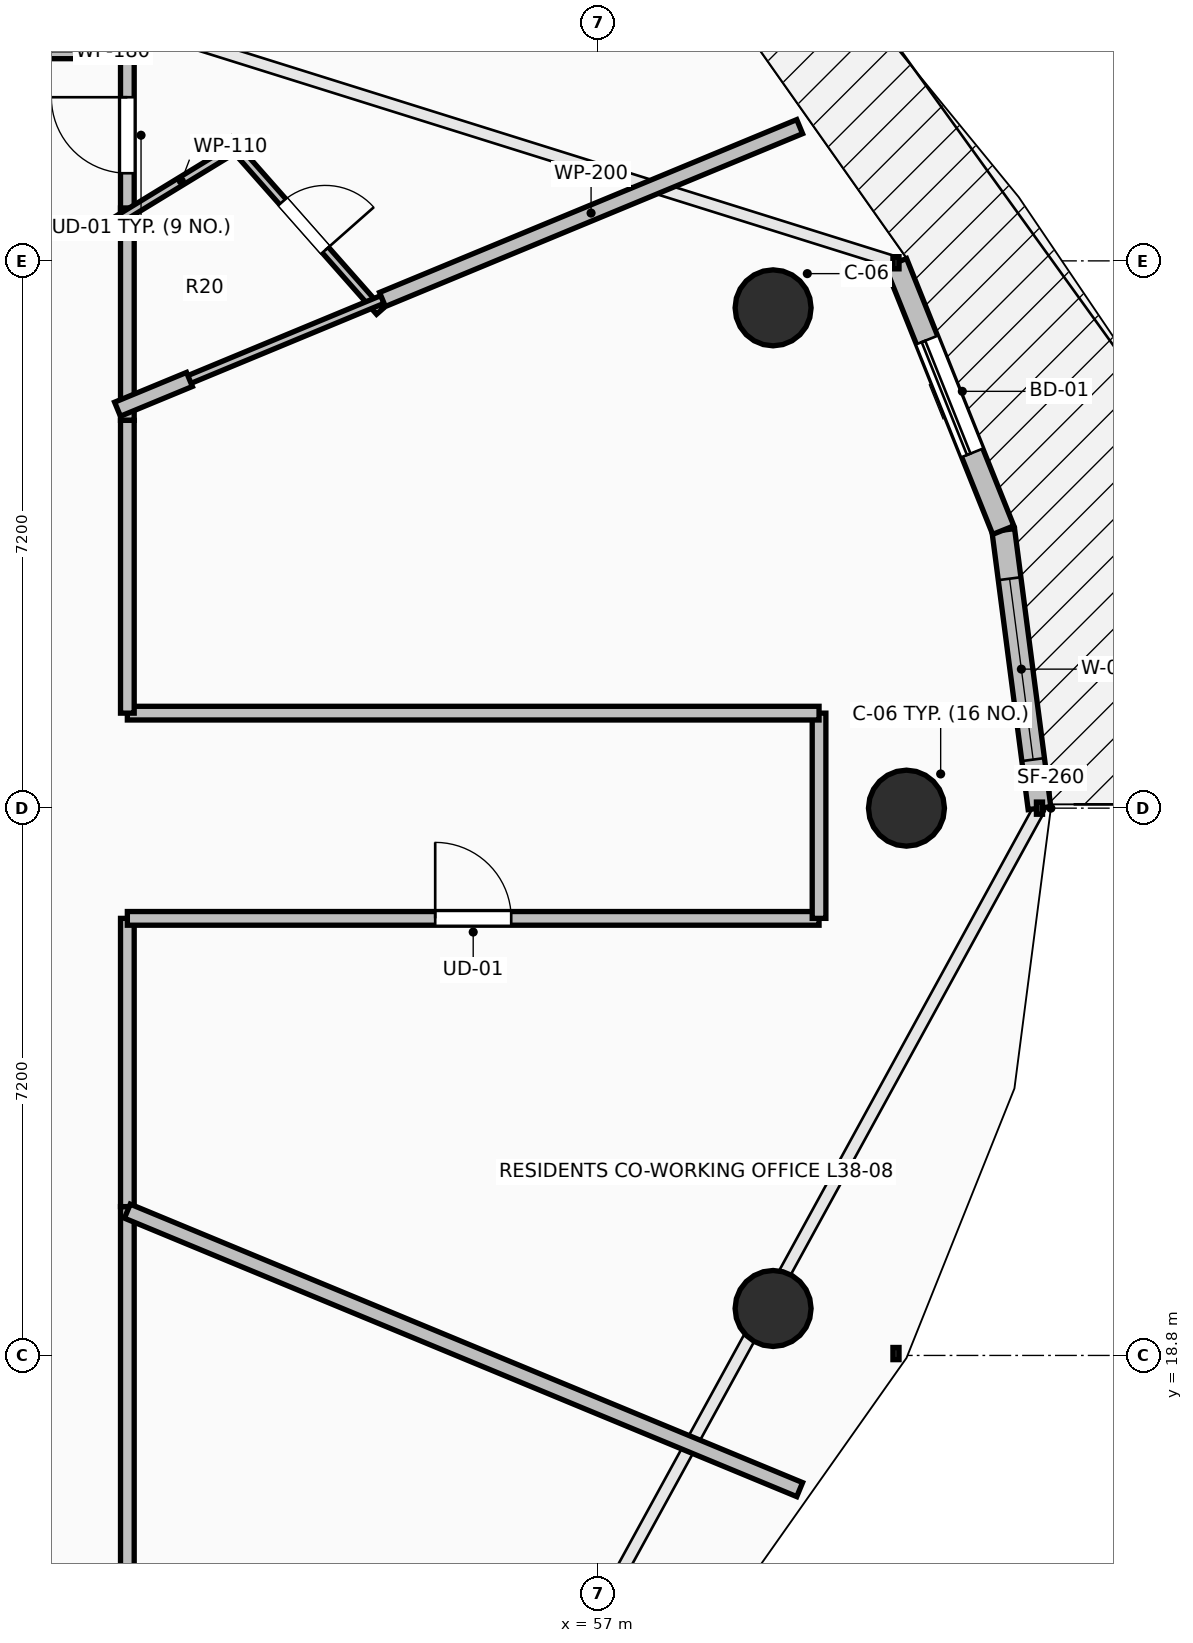
"""IFC4 building model, lengths in metres.
Left out: names, types, materials, properties, quantities, classifications, styles, units other than length and angle.
Written with IfcOpenShell. Run it as: python <this file> out.ifc"""

import sys

from ifc_helpers import new_model, si_unit, direction, frame, frame_2d, origin, origin_2d, place, context, subcontext, project, spatial, rectangle, circle, extrude, element, fill, save


model = new_model("IFC4")
c1 = context("Model", 3, precision=1e-05, world=origin(), true_north=direction((0.0, 1.0)))
c2 = subcontext(c1, "Body", "Model", "MODEL_VIEW")
j1 = project(units=[si_unit("LENGTHUNIT", "METRE"), si_unit("PLANEANGLEUNIT", "RADIAN")], contexts=[c1])
p1 = place(None, origin())
s1 = spatial("IfcSite", under=j1, at=p1, CompositionType="ELEMENT")
p2 = place(p1, origin())
s2 = spatial("IfcBuilding", under=s1, at=p2, CompositionType="ELEMENT")
p3 = place(p2, frame((0.0, 0.0, 143.1)))
s3 = spatial("IfcBuildingStorey", under=s2, at=p3, CompositionType="ELEMENT", Elevation=143.1)
for number, where, z_axis, x_axis in (
    (1, (61.05, 26.0, 0.0), (0.0, 0.0, 1.0), (1.0, 0.0, 0.0)),
    (2, (59.295, 32.582, 0.0), (0.0, 0.0, 1.0), (0.924, 0.383, 0.0)),
    (3, (59.295, 19.418, 0.0), (0.0, 0.0, 1.0), (0.924, -0.383, 0.0)),
):
    element("IfcColumn", number, at=place(p3, frame(where, z_axis=z_axis, x_axis=x_axis)), inside=s3, PredefinedType="COLUMN", context=c2, shape_type="SweptSolid", body=[
        extrude(circle(Radius=0.5, at=origin_2d()), origin(), (0.0, 0.0, 1.0), 3.5),
    ])
p4 = place(p3, frame((62.8, 26.0, 0.0), z_axis=(0.0, 0.0, 1.0), x_axis=(-0.129189225186, 0.991619959509, 0.0)))
e4 = element("IfcWall", 4, at=p4, inside=s3, PredefinedType="STANDARD", context=c2, shape_type="SweptSolid", body=[
    extrude(rectangle(XDim=3.689, YDim=0.3, at=frame_2d((1.844, 0.0))), origin(), (0.0, 0.0, 1.0), 3.24),
])
p5 = place(p4, frame((0.644, 0.0, 0.85)))
e5 = element("IfcOpeningElement", 5, at=p5, cuts=e4, PredefinedType="OPENING", context=c2, shape_type="SweptSolid", body=[
    extrude(rectangle(XDim=2.4, YDim=2.19, at=frame_2d((1.2, 1.095))), frame((0.0, 0.165, 0.0), z_axis=(0.0, -1.0, 0.0), x_axis=(1.0, 0.0, 0.0)), (0.0, 0.0, 1.0), 0.33),
])
p6 = place(p3, frame((62.323, 29.658, 0.0), z_axis=(0.0, 0.0, 1.0), x_axis=(-0.372401154411, 0.928071861546, 0.0)))
e6 = element("IfcWall", 6, at=p6, inside=s3, PredefinedType="STANDARD", context=c2, shape_type="SweptSolid", body=[
    extrude(rectangle(XDim=3.79, YDim=0.3, at=frame_2d((1.895, 0.0))), origin(), (0.0, 0.0, 1.0), 3.24),
])
p7 = place(p6, frame((1.095, 0.0, 0.0)))
e7 = element("IfcOpeningElement", 7, at=p7, cuts=e6, PredefinedType="OPENING", context=c2, shape_type="SweptSolid", body=[
    extrude(rectangle(XDim=1.6, YDim=2.3, at=frame_2d((0.8, 1.15))), frame((0.0, 0.165, 0.0), z_axis=(0.0, -1.0, 0.0), x_axis=(1.0, 0.0, 0.0)), (0.0, 0.0, 1.0), 0.33),
])
p8 = place(p3, frame((50.8, 33.756, 0.0), z_axis=(0.0, 0.0, 1.0), x_axis=(0.0, 1.0, 0.0)))
e8 = element("IfcWall", 8, at=p8, inside=s3, PredefinedType="PARTITIONING", context=c2, shape_type="SweptSolid", body=[
    extrude(rectangle(XDim=2.194, YDim=0.18, at=frame_2d((1.097, 0.0))), origin(), (0.0, 0.0, 1.0), 2.432),
])
p9 = place(p8, frame((0.597, 0.0, 0.0)))
e9 = element("IfcOpeningElement", 9, at=p9, cuts=e8, PredefinedType="OPENING", context=c2, shape_type="SweptSolid", body=[
    extrude(rectangle(XDim=1.0, YDim=2.15, at=frame_2d((0.5, 1.075))), frame((0.0, 0.105, 0.0), z_axis=(0.0, -1.0, 0.0), x_axis=(1.0, 0.0, 0.0)), (0.0, 0.0, 1.0), 0.21),
])
p10 = place(p3, frame((50.8, 35.95, 0.0), z_axis=(0.0, 0.0, 1.0), x_axis=(-1.0, 0.0, 0.0)))
e10 = element("IfcWall", 10, at=p10, inside=s3, PredefinedType="PARTITIONING", context=c2, shape_type="SweptSolid", body=[
    extrude(rectangle(XDim=2.096, YDim=0.18, at=frame_2d((1.048, 0.0))), origin(), (0.0, 0.0, 1.0), 2.972),
])
p11 = place(p3, frame((50.8, 31.102, 0.0), z_axis=(0.0, 0.0, 1.0), x_axis=(0.0, 1.0, 0.0)))
e11 = element("IfcWall", 11, at=p11, inside=s3, PredefinedType="PARTITIONING", context=c2, shape_type="SweptSolid", body=[
    extrude(rectangle(XDim=2.794, YDim=0.18, at=frame_2d((1.397, 0.0))), origin(), (0.0, 0.0, 1.0), 2.432),
])
p12 = place(p3, frame((50.8, 14.05, 0.0), z_axis=(0.0, 0.0, 1.0), x_axis=(0.0, 1.0, 0.0)))
e12 = element("IfcWall", 12, at=p12, inside=s3, PredefinedType="PARTITIONING", context=c2, shape_type="SweptSolid", body=[
    extrude(rectangle(XDim=6.708, YDim=0.18, at=frame_2d((3.354, 0.0))), origin(), (0.0, 0.0, 1.0), 2.432),
])
p13 = place(p3, frame((50.8, 20.758, 0.0), z_axis=(0.0, 0.0, 1.0), x_axis=(0.0, 1.0, 0.0)))
e13 = element("IfcWall", 13, at=p13, inside=s3, PredefinedType="PARTITIONING", context=c2, shape_type="SweptSolid", body=[
    extrude(rectangle(XDim=3.792, YDim=0.18, at=frame_2d((1.896, 0.0))), origin(), (0.0, 0.0, 1.0), 3.24),
])
p14 = place(p3, frame((50.8, 24.55, 0.0), z_axis=(0.0, 0.0, 1.0), x_axis=(1.0, 0.0, 0.0)))
e14 = element("IfcWall", 14, at=p14, inside=s3, PredefinedType="PARTITIONING", context=c2, shape_type="SweptSolid", body=[
    extrude(rectangle(XDim=9.1, YDim=0.18, at=frame_2d((4.55, 0.0))), origin(), (0.0, 0.0, 1.0), 2.432),
])
p15 = place(p14, frame((4.05, 0.0, 0.0)))
e15 = element("IfcOpeningElement", 15, at=p15, cuts=e14, PredefinedType="OPENING", context=c2, shape_type="SweptSolid", body=[
    extrude(rectangle(XDim=1.0, YDim=2.15, at=frame_2d((0.5, 1.075))), frame((0.0, 0.105, 0.0), z_axis=(0.0, -1.0, 0.0), x_axis=(1.0, 0.0, 0.0)), (0.0, 0.0, 1.0), 0.21),
])
p16 = place(p3, frame((59.9, 24.55, 0.0), z_axis=(0.0, 0.0, 1.0), x_axis=(0.0, 1.0, 0.0)))
e16 = element("IfcWall", 16, at=p16, inside=s3, PredefinedType="PARTITIONING", context=c2, shape_type="SweptSolid", body=[
    extrude(rectangle(XDim=2.7, YDim=0.18, at=frame_2d((1.35, 0.0))), origin(), (0.0, 0.0, 1.0), 2.432),
])
p17 = place(p3, frame((59.9, 27.25, 0.0), z_axis=(0.0, 0.0, 1.0), x_axis=(-1.0, 0.0, 0.0)))
e17 = element("IfcWall", 17, at=p17, inside=s3, PredefinedType="PARTITIONING", context=c2, shape_type="SweptSolid", body=[
    extrude(rectangle(XDim=9.1, YDim=0.18, at=frame_2d((4.55, 0.0))), origin(), (0.0, 0.0, 1.0), 2.432),
])
p18 = place(p3, frame((50.8, 27.25, 0.0), z_axis=(0.0, 0.0, 1.0), x_axis=(0.0, 1.0, 0.0)))
e18 = element("IfcWall", 18, at=p18, inside=s3, PredefinedType="PARTITIONING", context=c2, shape_type="SweptSolid", body=[
    extrude(rectangle(XDim=3.852, YDim=0.18, at=frame_2d((1.926, 0.0))), origin(), (0.0, 0.0, 1.0), 2.432),
])
p19 = place(p3, frame((50.68, 33.743, 0.0), z_axis=(0.0, 0.0, 1.0), x_axis=(0.853368681548, 0.52130786811, 0.0)))
e19 = element("IfcWall", 19, at=p19, inside=s3, PredefinedType="PARTITIONING", context=c2, shape_type="SweptSolid", body=[
    extrude(rectangle(XDim=1.945, YDim=0.11, at=frame_2d((0.973, 0.0))), origin(), (0.0, 0.0, 1.0), 2.972),
])
p20 = place(p3, frame((52.128, 34.789, 0.0), z_axis=(0.0, 0.0, 1.0), x_axis=(0.66196248337, -0.74953697081, 0.0)))
e20 = element("IfcWall", 20, at=p20, inside=s3, PredefinedType="PARTITIONING", context=c2, shape_type="SweptSolid", body=[
    extrude(rectangle(XDim=3.008, YDim=0.11, at=frame_2d((1.504, 0.0))), origin(), (0.0, 0.0, 1.0), 2.432),
])
p21 = place(p20, frame((1.079, 0.0, 0.0)))
e21 = element("IfcOpeningElement", 21, at=p21, cuts=e20, PredefinedType="OPENING", context=c2, shape_type="SweptSolid", body=[
    extrude(rectangle(XDim=0.85, YDim=2.1, at=frame_2d((0.425, 1.05))), frame((0.0, 0.07, 0.0), z_axis=(0.0, -1.0, 0.0), x_axis=(1.0, 0.0, 0.0)), (0.0, 0.0, 1.0), 0.14),
])
p22 = place(p3, frame((54.156, 32.693, 0.0), z_axis=(0.0, 0.0, 1.0), x_axis=(-0.923770555063, -0.382946421316, 0.0)))
e22 = element("IfcWall", 22, at=p22, inside=s3, PredefinedType="PARTITIONING", context=c2, shape_type="SweptSolid", body=[
    extrude(rectangle(XDim=2.889, YDim=0.11, at=frame_2d((1.444, 0.0))), origin(), (0.0, 0.0, 1.0), 2.432),
])
p23 = place(p3, frame((51.874, 38.824, 0.0), z_axis=(0.0, 0.0, 1.0), x_axis=(-0.734347971597, -0.678773199685, 0.0)))
e23 = element("IfcWall", 23, at=p23, inside=s3, PredefinedType="PARTITIONING", context=c2, shape_type="SweptSolid", body=[
    extrude(rectangle(XDim=4.235, YDim=0.14, at=frame_2d((2.117, 0.0))), origin(), (0.0, 0.0, 1.0), 2.922),
])
p24 = place(p23, frame((1.667, 0.0, 0.0)))
e24 = element("IfcOpeningElement", 24, at=p24, cuts=e23, PredefinedType="OPENING", context=c2, shape_type="SweptSolid", body=[
    extrude(rectangle(XDim=0.9, YDim=2.1, at=frame_2d((0.45, 1.05))), frame((0.0, 0.085, 0.0), z_axis=(0.0, -1.0, 0.0), x_axis=(1.0, 0.0, 0.0)), (0.0, 0.0, 1.0), 0.17),
])
p25 = place(p3, frame((54.156, 32.692, 0.0), z_axis=(0.0, 0.0, 1.0), x_axis=(0.923849528339, 0.382755860814, 0.0)))
e25 = element("IfcWall", 25, at=p25, inside=s3, PredefinedType="PARTITIONING", context=c2, shape_type="SweptSolid", body=[
    extrude(rectangle(XDim=5.941, YDim=0.2, at=frame_2d((2.97, 0.0))), origin(), (0.0, 0.0, 1.0), 2.432),
])
p26 = place(p3, frame((50.671, 31.249, 0.0), z_axis=(0.0, 0.0, 1.0), x_axis=(0.924089428906, 0.38217630406, 0.0)))
e26 = element("IfcWall", 26, at=p26, inside=s3, PredefinedType="PARTITIONING", context=c2, shape_type="SweptSolid", body=[
    extrude(rectangle(XDim=1.024, YDim=0.2, at=frame_2d((0.512, 0.0))), origin(), (0.0, 0.0, 1.0), 3.24),
])
p27 = place(p3, frame((50.908, 41.94, 0.0), z_axis=(0.0, 0.0, 1.0), x_axis=(-0.62935766896, -0.77711577292, 0.0)))
e27 = element("IfcWall", 27, at=p27, inside=s3, PredefinedType="PARTITIONING", context=c2, shape_type="SweptSolid", body=[
    extrude(rectangle(XDim=7.708, YDim=0.14, at=frame_2d((3.854, 0.0))), origin(), (0.0, 0.0, 1.0), 2.432),
])
p28 = place(p3, frame((59.645, 17.035, 0.0), z_axis=(0.0, 0.0, 1.0), x_axis=(-0.923902460479, 0.382628074665, 0.0)))
e28 = element("IfcWall", 28, at=p28, inside=s3, PredefinedType="PARTITIONING", context=c2, shape_type="SweptSolid", body=[
    extrude(rectangle(XDim=9.573, YDim=0.2, at=frame_2d((4.787, 0.0))), origin(), (0.0, 0.0, 1.0), 2.728),
])
p29 = place(p7, origin())
e29 = element("IfcDoor", 29, at=p29, inside=s3, OperationType="SLIDING_TO_LEFT", PredefinedType="DOOR", context=c2, shape_type="SweptSolid", body=[
    extrude(rectangle(XDim=1.6, YDim=2.3, at=frame_2d((0.8, 1.15))), frame((0.0, 0.025, 0.0), z_axis=(0.0, -1.0, 0.0), x_axis=(1.0, 0.0, 0.0)), (0.0, 0.0, 1.0), 0.05),
])
fill(e7, e29)
p30 = place(p5, origin())
e30 = element("IfcWindow", 30, at=p30, inside=s3, PartitioningType="SINGLE_PANEL", PredefinedType="WINDOW", context=c2, shape_type="SweptSolid", body=[
    extrude(rectangle(XDim=2.4, YDim=2.19, at=frame_2d((1.2, 1.095))), frame((0.0, 0.03, 0.0), z_axis=(0.0, -1.0, 0.0), x_axis=(1.0, 0.0, 0.0)), (0.0, 0.0, 1.0), 0.06),
])
fill(e5, e30)
p31 = place(p9, origin())
e31 = element("IfcDoor", 31, at=p31, inside=s3, OperationType="SINGLE_SWING_RIGHT", PredefinedType="DOOR", context=c2, shape_type="SweptSolid", body=[
    extrude(rectangle(XDim=1.0, YDim=2.15, at=frame_2d((0.5, 1.075))), frame((0.0, 0.025, 0.0), z_axis=(0.0, -1.0, 0.0), x_axis=(1.0, 0.0, 0.0)), (0.0, 0.0, 1.0), 0.05),
])
fill(e9, e31)
p32 = place(p15, origin())
e32 = element("IfcDoor", 32, at=p32, inside=s3, OperationType="SINGLE_SWING_LEFT", PredefinedType="DOOR", context=c2, shape_type="SweptSolid", body=[
    extrude(rectangle(XDim=1.0, YDim=2.15, at=frame_2d((0.5, 1.075))), frame((0.0, 0.025, 0.0), z_axis=(0.0, -1.0, 0.0), x_axis=(1.0, 0.0, 0.0)), (0.0, 0.0, 1.0), 0.05),
])
fill(e15, e32)
p33 = place(p21, origin())
e33 = element("IfcDoor", 33, at=p33, inside=s3, OperationType="SINGLE_SWING_RIGHT", PredefinedType="DOOR", context=c2, shape_type="SweptSolid", body=[
    extrude(rectangle(XDim=0.85, YDim=2.1, at=frame_2d((0.425, 1.05))), frame((0.0, 0.025, 0.0), z_axis=(0.0, -1.0, 0.0), x_axis=(1.0, 0.0, 0.0)), (0.0, 0.0, 1.0), 0.05),
])
fill(e21, e33)
save(model, sys.argv[1])
